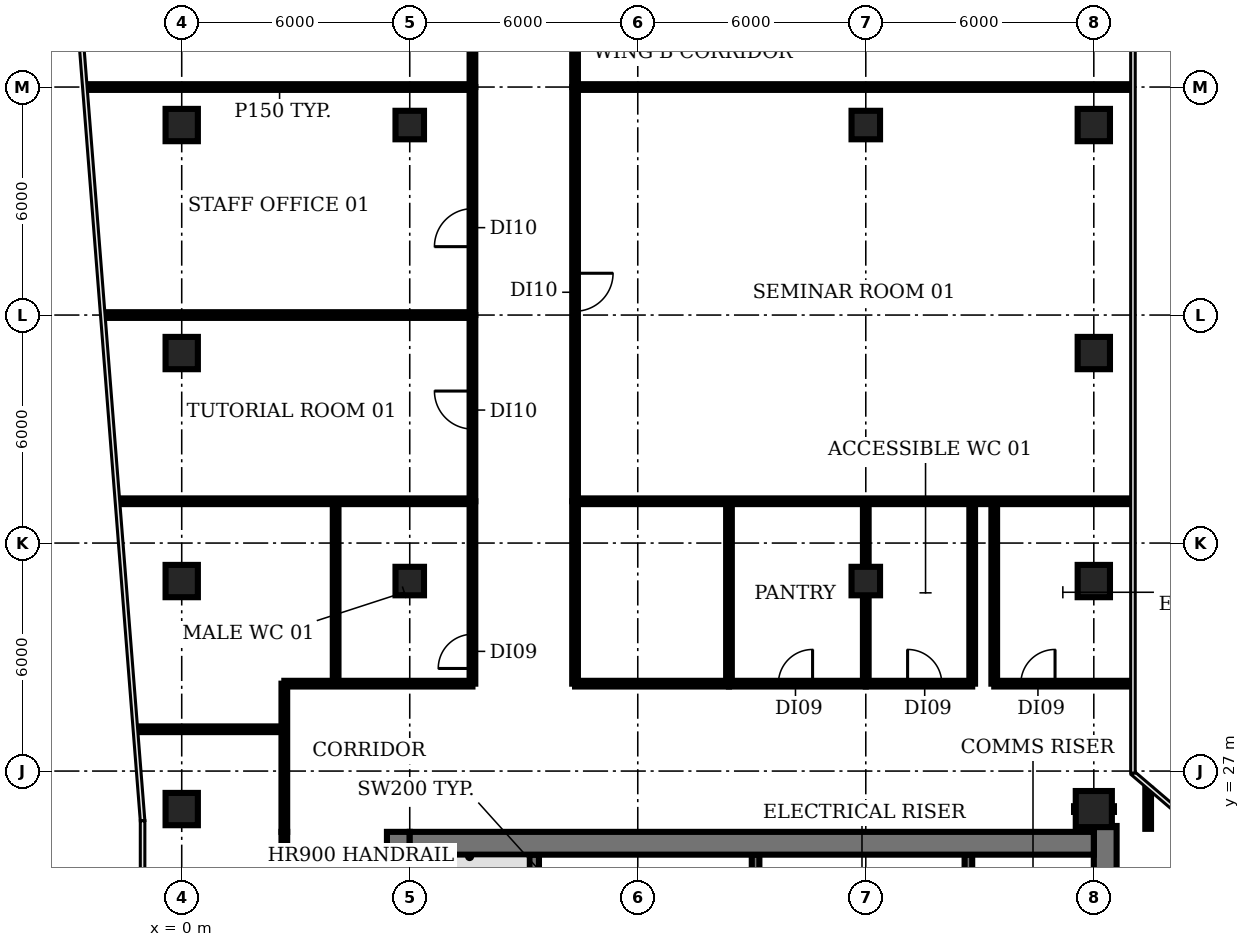
"""IFC4 building model, lengths in metres.
Left out: names, types, materials, properties, quantities, classifications, styles, units other than length and angle.
Written with IfcOpenShell. Run it as: python <this file> out.ifc"""

import sys

from ifc_helpers import new_model, si_unit, direction, frame, frame_2d, origin, origin_2d, place, context, subcontext, project, spatial, rectangle, circle, extrude, element, fill, save


model = new_model("IFC4")
c1 = context("Model", 3, precision=1e-05, world=origin(), true_north=direction((0.0, 1.0)))
c2 = subcontext(c1, "Body", "Model", "MODEL_VIEW")
j1 = project(units=[si_unit("LENGTHUNIT", "METRE"), si_unit("PLANEANGLEUNIT", "RADIAN")], contexts=[c1])
p1 = place(None, origin())
s1 = spatial("IfcSite", under=j1, at=p1, CompositionType="ELEMENT")
p2 = place(p1, origin())
s2 = spatial("IfcBuilding", under=s1, at=p2, CompositionType="ELEMENT")
p3 = place(p2, frame((0.0, 0.0, 188.6)))
s3 = spatial("IfcBuildingStorey", under=s2, at=p3, CompositionType="ELEMENT", Elevation=188.6)
for number, where, z_axis, x_axis in (
    (1, (0.0, 26.0, 0.0), (0.0, 0.0, 1.0), (1.0, 0.0, 0.0)),
    (2, (0.0, 32.0, 0.0), (0.0, 0.0, 1.0), (1.0, 0.0, 0.0)),
    (3, (0.0, 38.0, 0.0), (0.0, 0.0, 1.0), (1.0, 0.0, 0.0)),
    (4, (0.0, 44.0, 0.0), (0.0, 0.0, 1.0), (1.0, 0.0, 0.0)),
):
    element("IfcColumn", number, at=place(p3, frame(where, z_axis=z_axis, x_axis=x_axis)), inside=s3, PredefinedType="COLUMN", context=c2, shape_type="SweptSolid", body=[
        extrude(rectangle(XDim=0.85, YDim=0.85, at=origin_2d()), origin(), (0.0, 0.0, 1.0), 3.85),
    ])
for number, where, z_axis, x_axis in (
    (5, (6.0, 32.0, 0.0), (0.0, 0.0, 1.0), (1.0, 0.0, 0.0)),
    (6, (6.0, 44.0, 0.0), (0.0, 0.0, 1.0), (1.0, 0.0, 0.0)),
    (7, (18.0, 32.0, 0.0), (0.0, 0.0, 1.0), (1.0, 0.0, 0.0)),
    (8, (18.0, 44.0, 0.0), (0.0, 0.0, 1.0), (1.0, 0.0, 0.0)),
):
    element("IfcColumn", number, at=place(p3, frame(where, z_axis=z_axis, x_axis=x_axis)), inside=s3, PredefinedType="COLUMN", context=c2, shape_type="SweptSolid", body=[
        extrude(rectangle(XDim=0.75, YDim=0.75, at=origin_2d()), origin(), (0.0, 0.0, 1.0), 3.85),
    ])
p4 = place(p3, frame((24.0, 26.0, 0.0), z_axis=(0.0, 0.0, 1.0), x_axis=(1.0, 0.0, 0.0)))
e9 = element("IfcColumn", 9, at=p4, inside=s3, PredefinedType="COLUMN", context=c2, shape_type="SweptSolid", body=[
    extrude(circle(Radius=0.475, at=origin_2d()), origin(), (0.0, 0.0, 1.0), 3.85),
])
for number, where, z_axis, x_axis in (
    (10, (24.0, 32.0, 0.0), (0.0, 0.0, 1.0), (1.0, 0.0, 0.0)),
    (11, (24.0, 38.0, 0.0), (0.0, 0.0, 1.0), (1.0, 0.0, 0.0)),
    (12, (24.0, 44.0, 0.0), (0.0, 0.0, 1.0), (1.0, 0.0, 0.0)),
):
    element("IfcColumn", number, at=place(p3, frame(where, z_axis=z_axis, x_axis=x_axis)), inside=s3, PredefinedType="COLUMN", context=c2, shape_type="SweptSolid", body=[
        extrude(rectangle(XDim=0.85, YDim=0.85, at=origin_2d()), origin(), (0.0, 0.0, 1.0), 3.85),
    ])
p5 = place(p3, frame((9.275, 18.375, 0.0), z_axis=(0.0, 0.0, 1.0), x_axis=(0.0, 1.0, 0.0)))
e13 = element("IfcWall", 13, at=p5, inside=s3, PredefinedType="SHEAR", context=c2, shape_type="SweptSolid", body=[
    extrude(rectangle(XDim=6.425, YDim=0.25, at=frame_2d((3.212, 0.0))), origin(), (0.0, 0.0, 1.0), 3.85),
])
for number, where, z_axis, x_axis in (
    (14, (15.1, 22.9, 0.0), (0.0, 0.0, 1.0), (0.0, 1.0, 0.0)),
    (15, (20.7, 22.9, 0.0), (0.0, 0.0, 1.0), (0.0, 1.0, 0.0)),
):
    element("IfcWall", number, at=place(p3, frame(where, z_axis=z_axis, x_axis=x_axis)), inside=s3, PredefinedType="SHEAR", context=c2, shape_type="SweptSolid", body=[
        extrude(rectangle(XDim=1.9, YDim=0.2, at=frame_2d((0.95, 0.0))), origin(), (0.0, 0.0, 1.0), 3.85),
    ])
p6 = place(p3, frame((5.7, 4.8, 0.0), z_axis=(0.0, 0.0, 1.0), x_axis=(0.0, 1.0, 0.0)))
e16 = element("IfcWall", 16, at=p6, inside=s3, PredefinedType="SHEAR", context=c2, shape_type="SweptSolid", body=[
    extrude(rectangle(XDim=20.6, YDim=0.6, at=frame_2d((10.3, 0.0))), origin(), (0.0, 0.0, 1.0), 3.85),
])
p7 = place(p6, frame((0.85, 0.0, 0.0)))
e17 = element("IfcOpeningElement", 17, at=p7, cuts=e16, PredefinedType="OPENING", context=c2, shape_type="SweptSolid", body=[
    extrude(rectangle(XDim=1.5, YDim=2.1, at=frame_2d((0.75, 1.05))), frame((0.0, 0.31, 0.0), z_axis=(0.0, -1.0, 0.0), x_axis=(1.0, 0.0, 0.0)), (0.0, 0.0, 1.0), 0.62),
])
p8 = place(p6, frame((7.3, 0.0, 0.0)))
e18 = element("IfcOpeningElement", 18, at=p8, cuts=e16, PredefinedType="OPENING", context=c2, shape_type="SweptSolid", body=[
    extrude(rectangle(XDim=1.2, YDim=2.1, at=frame_2d((0.6, 1.05))), frame((0.0, 0.31, 0.0), z_axis=(0.0, -1.0, 0.0), x_axis=(1.0, 0.0, 0.0)), (0.0, 0.0, 1.0), 0.62),
])
p9 = place(p6, frame((13.85, 0.0, 0.0)))
e19 = element("IfcOpeningElement", 19, at=p9, cuts=e16, PredefinedType="OPENING", context=c2, shape_type="SweptSolid", body=[
    extrude(rectangle(XDim=1.2, YDim=2.1, at=frame_2d((0.6, 1.05))), frame((0.0, 0.31, 0.0), z_axis=(0.0, -1.0, 0.0), x_axis=(1.0, 0.0, 0.0)), (0.0, 0.0, 1.0), 0.62),
])
p10 = place(p3, frame((24.3, 25.555, 0.0), z_axis=(0.0, 0.0, 1.0), x_axis=(0.0, -1.0, 0.0)))
e20 = element("IfcWall", 20, at=p10, inside=s3, PredefinedType="SHEAR", context=c2, shape_type="SweptSolid", body=[
    extrude(rectangle(XDim=20.755, YDim=0.6, at=frame_2d((10.377, 0.0))), origin(), (0.0, 0.0, 1.0), 3.85),
])
p11 = place(p10, frame((18.405, 0.0, 0.0)))
e21 = element("IfcOpeningElement", 21, at=p11, cuts=e20, PredefinedType="OPENING", context=c2, shape_type="SweptSolid", body=[
    extrude(rectangle(XDim=1.5, YDim=2.1, at=frame_2d((0.75, 1.05))), frame((0.0, 0.31, 0.0), z_axis=(0.0, -1.0, 0.0), x_axis=(1.0, 0.0, 0.0)), (0.0, 0.0, 1.0), 0.62),
])
p12 = place(p10, frame((12.305, 0.0, 0.0)))
e22 = element("IfcOpeningElement", 22, at=p12, cuts=e20, PredefinedType="OPENING", context=c2, shape_type="SweptSolid", body=[
    extrude(rectangle(XDim=0.9, YDim=2.1, at=frame_2d((0.45, 1.05))), frame((0.0, 0.31, 0.0), z_axis=(0.0, -1.0, 0.0), x_axis=(1.0, 0.0, 0.0)), (0.0, 0.0, 1.0), 0.62),
])
p13 = place(p10, frame((6.305, 0.0, 0.0)))
e23 = element("IfcOpeningElement", 23, at=p13, cuts=e20, PredefinedType="OPENING", context=c2, shape_type="SweptSolid", body=[
    extrude(rectangle(XDim=2.0, YDim=2.1, at=frame_2d((1.0, 1.05))), frame((0.0, 0.31, 0.0), z_axis=(0.0, -1.0, 0.0), x_axis=(1.0, 0.0, 0.0)), (0.0, 0.0, 1.0), 0.62),
])
p14 = place(p3, frame((6.0, 25.1, 0.0), z_axis=(0.0, 0.0, 1.0), x_axis=(1.0, 0.0, 0.0)))
e24 = element("IfcWall", 24, at=p14, inside=s3, PredefinedType="SHEAR", context=c2, shape_type="SweptSolid", body=[
    extrude(rectangle(XDim=18.0, YDim=0.6, at=frame_2d((9.0, 0.0))), origin(), (0.0, 0.0, 1.0), 3.85),
])
p15 = place(p3, frame((-2.5, 45.0, 0.0), z_axis=(0.0, 0.0, 1.0), x_axis=(1.0, 0.0, 0.0)))
e25 = element("IfcWall", 25, at=p15, inside=s3, PredefinedType="PARTITIONING", context=c2, shape_type="SweptSolid", body=[
    extrude(rectangle(XDim=10.15, YDim=0.15, at=frame_2d((5.075, 0.0))), origin(), (0.0, 0.0, 1.0), 2.88),
])
p16 = place(p3, frame((-2.03, 39.0, 0.0), z_axis=(0.0, 0.0, 1.0), x_axis=(1.0, 0.0, 0.0)))
e26 = element("IfcWall", 26, at=p16, inside=s3, PredefinedType="PARTITIONING", context=c2, shape_type="SweptSolid", body=[
    extrude(rectangle(XDim=9.68, YDim=0.15, at=frame_2d((4.84, 0.0))), origin(), (0.0, 0.0, 1.0), 2.88),
])
p17 = place(p3, frame((-1.64, 34.1, 0.0), z_axis=(0.0, 0.0, 1.0), x_axis=(1.0, 0.0, 0.0)))
e27 = element("IfcWall", 27, at=p17, inside=s3, PredefinedType="PARTITIONING", context=c2, shape_type="SweptSolid", body=[
    extrude(rectangle(XDim=9.29, YDim=0.15, at=frame_2d((4.645, 0.0))), origin(), (0.0, 0.0, 1.0), 2.88),
])
p18 = place(p3, frame((-1.17, 28.1, 0.0), z_axis=(0.0, 0.0, 1.0), x_axis=(1.0, 0.0, 0.0)))
e28 = element("IfcWall", 28, at=p18, inside=s3, PredefinedType="PARTITIONING", context=c2, shape_type="SweptSolid", body=[
    extrude(rectangle(XDim=3.87, YDim=0.15, at=frame_2d((1.935, 0.0))), origin(), (0.0, 0.0, 1.0), 2.88),
])
p19 = place(p3, frame((2.7, 4.8, 0.0), z_axis=(0.0, 0.0, 1.0), x_axis=(0.0, 1.0, 0.0)))
e29 = element("IfcWall", 29, at=p19, inside=s3, PredefinedType="PARTITIONING", context=c2, shape_type="SweptSolid", body=[
    extrude(rectangle(XDim=20.6, YDim=0.15, at=frame_2d((10.3, 0.0))), origin(), (0.0, 0.0, 1.0), 2.88),
])
p20 = place(p19, frame((10.2, 0.0, 0.0)))
e30 = element("IfcOpeningElement", 30, at=p20, cuts=e29, PredefinedType="OPENING", context=c2, shape_type="SweptSolid", body=[
    extrude(rectangle(XDim=1.2, YDim=2.1, at=frame_2d((0.6, 1.05))), frame((0.0, 0.085, 0.0), z_axis=(0.0, -1.0, 0.0), x_axis=(1.0, 0.0, 0.0)), (0.0, 0.0, 1.0), 0.17),
])
p21 = place(p3, frame((2.7, 25.4, 0.0), z_axis=(0.0, 0.0, 1.0), x_axis=(0.0, 1.0, 0.0)))
e31 = element("IfcWall", 31, at=p21, inside=s3, PredefinedType="PARTITIONING", context=c2, shape_type="SweptSolid", body=[
    extrude(rectangle(XDim=3.9, YDim=0.15, at=frame_2d((1.95, 0.0))), origin(), (0.0, 0.0, 1.0), 2.88),
])
p22 = place(p3, frame((2.7, 29.3, 0.0), z_axis=(0.0, 0.0, 1.0), x_axis=(1.0, 0.0, 0.0)))
e32 = element("IfcWall", 32, at=p22, inside=s3, PredefinedType="PARTITIONING", context=c2, shape_type="SweptSolid", body=[
    extrude(rectangle(XDim=4.95, YDim=0.15, at=frame_2d((2.475, 0.0))), origin(), (0.0, 0.0, 1.0), 2.88),
])
p23 = place(p3, frame((4.05, 29.3, 0.0), z_axis=(0.0, 0.0, 1.0), x_axis=(0.0, 1.0, 0.0)))
e33 = element("IfcWall", 33, at=p23, inside=s3, PredefinedType="PARTITIONING", context=c2, shape_type="SweptSolid", body=[
    extrude(rectangle(XDim=4.8, YDim=0.15, at=frame_2d((2.4, 0.0))), origin(), (0.0, 0.0, 1.0), 2.88),
])
p24 = place(p3, frame((7.65, 29.3, 0.0), z_axis=(0.0, 0.0, 1.0), x_axis=(0.0, 1.0, 0.0)))
e34 = element("IfcWall", 34, at=p24, inside=s3, PredefinedType="PARTITIONING", context=c2, shape_type="SweptSolid", body=[
    extrude(rectangle(XDim=4.8, YDim=0.15, at=frame_2d((2.4, 0.0))), origin(), (0.0, 0.0, 1.0), 2.88),
])
p25 = place(p24, frame((0.4, 0.0, 0.0)))
e35 = element("IfcOpeningElement", 35, at=p25, cuts=e34, PredefinedType="OPENING", context=c2, shape_type="SweptSolid", body=[
    extrude(rectangle(XDim=0.9, YDim=2.1, at=frame_2d((0.45, 1.05))), frame((0.0, 0.085, 0.0), z_axis=(0.0, -1.0, 0.0), x_axis=(1.0, 0.0, 0.0)), (0.0, 0.0, 1.0), 0.17),
])
p26 = place(p3, frame((7.65, 34.1, 0.0), z_axis=(0.0, 0.0, 1.0), x_axis=(0.0, 1.0, 0.0)))
e36 = element("IfcWall", 36, at=p26, inside=s3, PredefinedType="PARTITIONING", context=c2, shape_type="SweptSolid", body=[
    extrude(rectangle(XDim=4.9, YDim=0.15, at=frame_2d((2.45, 0.0))), origin(), (0.0, 0.0, 1.0), 2.88),
])
p27 = place(p26, frame((1.9, 0.0, 0.0)))
e37 = element("IfcOpeningElement", 37, at=p27, cuts=e36, PredefinedType="OPENING", context=c2, shape_type="SweptSolid", body=[
    extrude(rectangle(XDim=1.0, YDim=2.1, at=frame_2d((0.5, 1.05))), frame((0.0, 0.085, 0.0), z_axis=(0.0, -1.0, 0.0), x_axis=(1.0, 0.0, 0.0)), (0.0, 0.0, 1.0), 0.17),
])
p28 = place(p3, frame((7.65, 39.0, 0.0), z_axis=(0.0, 0.0, 1.0), x_axis=(0.0, 1.0, 0.0)))
e38 = element("IfcWall", 38, at=p28, inside=s3, PredefinedType="PARTITIONING", context=c2, shape_type="SweptSolid", body=[
    extrude(rectangle(XDim=6.0, YDim=0.15, at=frame_2d((3.0, 0.0))), origin(), (0.0, 0.0, 1.0), 2.88),
])
p29 = place(p28, frame((1.8, 0.0, 0.0)))
e39 = element("IfcOpeningElement", 39, at=p29, cuts=e38, PredefinedType="OPENING", context=c2, shape_type="SweptSolid", body=[
    extrude(rectangle(XDim=1.0, YDim=2.1, at=frame_2d((0.5, 1.05))), frame((0.0, 0.085, 0.0), z_axis=(0.0, -1.0, 0.0), x_axis=(1.0, 0.0, 0.0)), (0.0, 0.0, 1.0), 0.17),
])
p30 = place(p3, frame((7.65, 45.0, 0.0), z_axis=(0.0, 0.0, 1.0), x_axis=(0.0, 1.0, 0.0)))
e40 = element("IfcWall", 40, at=p30, inside=s3, PredefinedType="PARTITIONING", context=c2, shape_type="SweptSolid", body=[
    extrude(rectangle(XDim=18.09, YDim=0.15, at=frame_2d((9.045, 0.0))), origin(), (0.0, 0.0, 1.0), 2.88),
])
p31 = place(p30, frame((7.88, 0.0, 0.0)))
e41 = element("IfcOpeningElement", 41, at=p31, cuts=e40, PredefinedType="OPENING", context=c2, shape_type="SweptSolid", body=[
    extrude(rectangle(XDim=1.2, YDim=2.1, at=frame_2d((0.6, 1.05))), frame((0.0, 0.085, 0.0), z_axis=(0.0, -1.0, 0.0), x_axis=(1.0, 0.0, 0.0)), (0.0, 0.0, 1.0), 0.17),
])
p32 = place(p3, frame((10.35, 29.3, 0.0), z_axis=(0.0, 0.0, 1.0), x_axis=(0.0, 1.0, 0.0)))
e42 = element("IfcWall", 42, at=p32, inside=s3, PredefinedType="PARTITIONING", context=c2, shape_type="SweptSolid", body=[
    extrude(rectangle(XDim=4.8, YDim=0.15, at=frame_2d((2.4, 0.0))), origin(), (0.0, 0.0, 1.0), 2.88),
])
p33 = place(p3, frame((10.35, 29.3, 0.0), z_axis=(0.0, 0.0, 1.0), x_axis=(1.0, 0.0, 0.0)))
e43 = element("IfcWall", 43, at=p33, inside=s3, PredefinedType="PARTITIONING", context=c2, shape_type="SweptSolid", body=[
    extrude(rectangle(XDim=4.05, YDim=0.15, at=frame_2d((2.025, 0.0))), origin(), (0.0, 0.0, 1.0), 2.88),
])
p34 = place(p3, frame((10.35, 34.1, 0.0), z_axis=(0.0, 0.0, 1.0), x_axis=(1.0, 0.0, 0.0)))
e44 = element("IfcWall", 44, at=p34, inside=s3, PredefinedType="PARTITIONING", context=c2, shape_type="SweptSolid", body=[
    extrude(rectangle(XDim=14.63, YDim=0.15, at=frame_2d((7.315, 0.0))), origin(), (0.0, 0.0, 1.0), 2.88),
])
p35 = place(p3, frame((10.35, 45.0, 0.0), z_axis=(0.0, 0.0, 1.0), x_axis=(0.0, -1.0, 0.0)))
e45 = element("IfcWall", 45, at=p35, inside=s3, PredefinedType="PARTITIONING", context=c2, shape_type="SweptSolid", body=[
    extrude(rectangle(XDim=10.9, YDim=0.15, at=frame_2d((5.45, 0.0))), origin(), (0.0, 0.0, 1.0), 2.88),
])
p36 = place(p35, frame((4.9, 0.0, 0.0)))
e46 = element("IfcOpeningElement", 46, at=p36, cuts=e45, PredefinedType="OPENING", context=c2, shape_type="SweptSolid", body=[
    extrude(rectangle(XDim=1.0, YDim=2.1, at=frame_2d((0.5, 1.05))), frame((0.0, 0.085, 0.0), z_axis=(0.0, -1.0, 0.0), x_axis=(1.0, 0.0, 0.0)), (0.0, 0.0, 1.0), 0.17),
])
p37 = place(p3, frame((10.35, 45.0, 0.0), z_axis=(0.0, 0.0, 1.0), x_axis=(1.0, 0.0, 0.0)))
e47 = element("IfcWall", 47, at=p37, inside=s3, PredefinedType="PARTITIONING", context=c2, shape_type="SweptSolid", body=[
    extrude(rectangle(XDim=14.615, YDim=0.15, at=frame_2d((7.308, 0.0))), origin(), (0.0, 0.0, 1.0), 2.88),
])
p38 = place(p3, frame((10.35, 51.0, 0.0), z_axis=(0.0, 0.0, 1.0), x_axis=(0.0, -1.0, 0.0)))
e48 = element("IfcWall", 48, at=p38, inside=s3, PredefinedType="PARTITIONING", context=c2, shape_type="SweptSolid", body=[
    extrude(rectangle(XDim=6.0, YDim=0.15, at=frame_2d((3.0, 0.0))), origin(), (0.0, 0.0, 1.0), 2.88),
])
p39 = place(p38, frame((2.4, 0.0, 0.0)))
e49 = element("IfcOpeningElement", 49, at=p39, cuts=e48, PredefinedType="OPENING", context=c2, shape_type="SweptSolid", body=[
    extrude(rectangle(XDim=1.0, YDim=2.1, at=frame_2d((0.5, 1.05))), frame((0.0, 0.085, 0.0), z_axis=(0.0, -1.0, 0.0), x_axis=(1.0, 0.0, 0.0)), (0.0, 0.0, 1.0), 0.17),
])
p40 = place(p3, frame((14.4, 29.3, 0.0), z_axis=(0.0, 0.0, 1.0), x_axis=(0.0, 1.0, 0.0)))
e50 = element("IfcWall", 50, at=p40, inside=s3, PredefinedType="PARTITIONING", context=c2, shape_type="SweptSolid", body=[
    extrude(rectangle(XDim=4.8, YDim=0.15, at=frame_2d((2.4, 0.0))), origin(), (0.0, 0.0, 1.0), 2.88),
])
p41 = place(p3, frame((14.4, 29.3, 0.0), z_axis=(0.0, 0.0, 1.0), x_axis=(1.0, 0.0, 0.0)))
e51 = element("IfcWall", 51, at=p41, inside=s3, PredefinedType="PARTITIONING", context=c2, shape_type="SweptSolid", body=[
    extrude(rectangle(XDim=3.6, YDim=0.15, at=frame_2d((1.8, 0.0))), origin(), (0.0, 0.0, 1.0), 2.88),
])
p42 = place(p41, frame((1.3, 0.0, 0.0)))
e52 = element("IfcOpeningElement", 52, at=p42, cuts=e51, PredefinedType="OPENING", context=c2, shape_type="SweptSolid", body=[
    extrude(rectangle(XDim=0.9, YDim=2.1, at=frame_2d((0.45, 1.05))), frame((0.0, 0.085, 0.0), z_axis=(0.0, -1.0, 0.0), x_axis=(1.0, 0.0, 0.0)), (0.0, 0.0, 1.0), 0.17),
])
p43 = place(p3, frame((18.0, 29.3, 0.0), z_axis=(0.0, 0.0, 1.0), x_axis=(0.0, 1.0, 0.0)))
e53 = element("IfcWall", 53, at=p43, inside=s3, PredefinedType="PARTITIONING", context=c2, shape_type="SweptSolid", body=[
    extrude(rectangle(XDim=4.8, YDim=0.15, at=frame_2d((2.4, 0.0))), origin(), (0.0, 0.0, 1.0), 2.88),
])
p44 = place(p3, frame((18.0, 29.3, 0.0), z_axis=(0.0, 0.0, 1.0), x_axis=(1.0, 0.0, 0.0)))
e54 = element("IfcWall", 54, at=p44, inside=s3, PredefinedType="PARTITIONING", context=c2, shape_type="SweptSolid", body=[
    extrude(rectangle(XDim=2.8, YDim=0.15, at=frame_2d((1.4, 0.0))), origin(), (0.0, 0.0, 1.0), 2.88),
])
p45 = place(p44, frame((1.1, 0.0, 0.0)))
e55 = element("IfcOpeningElement", 55, at=p45, cuts=e54, PredefinedType="OPENING", context=c2, shape_type="SweptSolid", body=[
    extrude(rectangle(XDim=0.9, YDim=2.1, at=frame_2d((0.45, 1.05))), frame((0.0, 0.085, 0.0), z_axis=(0.0, -1.0, 0.0), x_axis=(1.0, 0.0, 0.0)), (0.0, 0.0, 1.0), 0.17),
])
for number, where, z_axis, x_axis in (
    (56, (20.8, 29.3, 0.0), (0.0, 0.0, 1.0), (0.0, 1.0, 0.0)),
    (57, (21.38, 29.3, 0.0), (0.0, 0.0, 1.0), (0.0, 1.0, 0.0)),
):
    element("IfcWall", number, at=place(p3, frame(where, z_axis=z_axis, x_axis=x_axis)), inside=s3, PredefinedType="PARTITIONING", context=c2, shape_type="SweptSolid", body=[
        extrude(rectangle(XDim=4.8, YDim=0.15, at=frame_2d((2.4, 0.0))), origin(), (0.0, 0.0, 1.0), 2.88),
    ])
p46 = place(p3, frame((21.38, 29.3, 0.0), z_axis=(0.0, 0.0, 1.0), x_axis=(1.0, 0.0, 0.0)))
e58 = element("IfcWall", 58, at=p46, inside=s3, PredefinedType="PARTITIONING", context=c2, shape_type="SweptSolid", body=[
    extrude(rectangle(XDim=3.6, YDim=0.15, at=frame_2d((1.8, 0.0))), origin(), (0.0, 0.0, 1.0), 2.88),
])
p47 = place(p46, frame((0.7, 0.0, 0.0)))
e59 = element("IfcOpeningElement", 59, at=p47, cuts=e58, PredefinedType="OPENING", context=c2, shape_type="SweptSolid", body=[
    extrude(rectangle(XDim=0.9, YDim=2.1, at=frame_2d((0.45, 1.05))), frame((0.0, 0.085, 0.0), z_axis=(0.0, -1.0, 0.0), x_axis=(1.0, 0.0, 0.0)), (0.0, 0.0, 1.0), 0.17),
])
for number, where, z_axis, x_axis in (
    (60, (23.48, 26.0, 0.0), (0.0, 0.0, 1.0), (1.0, 0.0, 0.0)),
    (61, (25.43, 25.48, 0.0), (0.0, 0.0, 1.0), (0.0, 1.0, 0.0)),
):
    element("IfcWall", number, at=place(p3, frame(where, z_axis=z_axis, x_axis=x_axis)), inside=s3, PredefinedType="PARTITIONING", context=c2, shape_type="SweptSolid", body=[
        extrude(rectangle(XDim=1.05, YDim=0.15, at=frame_2d((0.525, 0.0))), origin(), (0.0, 0.0, 1.0), 2.88),
    ])
p48 = place(p25, origin())
e62 = element("IfcDoor", 62, at=p48, inside=s3, OperationType="SINGLE_SWING_LEFT", PredefinedType="DOOR", context=c2, shape_type="SweptSolid", body=[
    extrude(rectangle(XDim=0.9, YDim=2.1, at=frame_2d((0.45, 1.05))), frame((0.0, 0.025, 0.0), z_axis=(0.0, -1.0, 0.0), x_axis=(1.0, 0.0, 0.0)), (0.0, 0.0, 1.0), 0.05),
])
fill(e35, e62)
p49 = place(p27, origin())
e63 = element("IfcDoor", 63, at=p49, inside=s3, OperationType="SINGLE_SWING_RIGHT", PredefinedType="DOOR", context=c2, shape_type="SweptSolid", body=[
    extrude(rectangle(XDim=1.0, YDim=2.1, at=frame_2d((0.5, 1.05))), frame((0.0, 0.025, 0.0), z_axis=(0.0, -1.0, 0.0), x_axis=(1.0, 0.0, 0.0)), (0.0, 0.0, 1.0), 0.05),
])
fill(e37, e63)
p50 = place(p29, origin())
e64 = element("IfcDoor", 64, at=p50, inside=s3, OperationType="SINGLE_SWING_LEFT", PredefinedType="DOOR", context=c2, shape_type="SweptSolid", body=[
    extrude(rectangle(XDim=1.0, YDim=2.1, at=frame_2d((0.5, 1.05))), frame((0.0, 0.025, 0.0), z_axis=(0.0, -1.0, 0.0), x_axis=(1.0, 0.0, 0.0)), (0.0, 0.0, 1.0), 0.05),
])
fill(e39, e64)
p51 = place(p36, origin())
e65 = element("IfcDoor", 65, at=p51, inside=s3, OperationType="SINGLE_SWING_LEFT", PredefinedType="DOOR", context=c2, shape_type="SweptSolid", body=[
    extrude(rectangle(XDim=1.0, YDim=2.1, at=frame_2d((0.5, 1.05))), frame((0.0, 0.025, 0.0), z_axis=(0.0, -1.0, 0.0), x_axis=(1.0, 0.0, 0.0)), (0.0, 0.0, 1.0), 0.05),
])
fill(e46, e65)
p52 = place(p42, origin())
e66 = element("IfcDoor", 66, at=p52, inside=s3, OperationType="SINGLE_SWING_RIGHT", PredefinedType="DOOR", context=c2, shape_type="SweptSolid", body=[
    extrude(rectangle(XDim=0.9, YDim=2.1, at=frame_2d((0.45, 1.05))), frame((0.0, 0.025, 0.0), z_axis=(0.0, -1.0, 0.0), x_axis=(1.0, 0.0, 0.0)), (0.0, 0.0, 1.0), 0.05),
])
fill(e52, e66)
p53 = place(p45, origin())
e67 = element("IfcDoor", 67, at=p53, inside=s3, OperationType="SINGLE_SWING_LEFT", PredefinedType="DOOR", context=c2, shape_type="SweptSolid", body=[
    extrude(rectangle(XDim=0.9, YDim=2.1, at=frame_2d((0.45, 1.05))), frame((0.0, 0.025, 0.0), z_axis=(0.0, -1.0, 0.0), x_axis=(1.0, 0.0, 0.0)), (0.0, 0.0, 1.0), 0.05),
])
fill(e55, e67)
p54 = place(p47, origin())
e68 = element("IfcDoor", 68, at=p54, inside=s3, OperationType="SINGLE_SWING_RIGHT", PredefinedType="DOOR", context=c2, shape_type="SweptSolid", body=[
    extrude(rectangle(XDim=0.9, YDim=2.1, at=frame_2d((0.45, 1.05))), frame((0.0, 0.025, 0.0), z_axis=(0.0, -1.0, 0.0), x_axis=(1.0, 0.0, 0.0)), (0.0, 0.0, 1.0), 0.05),
])
fill(e59, e68)
save(model, sys.argv[1])
